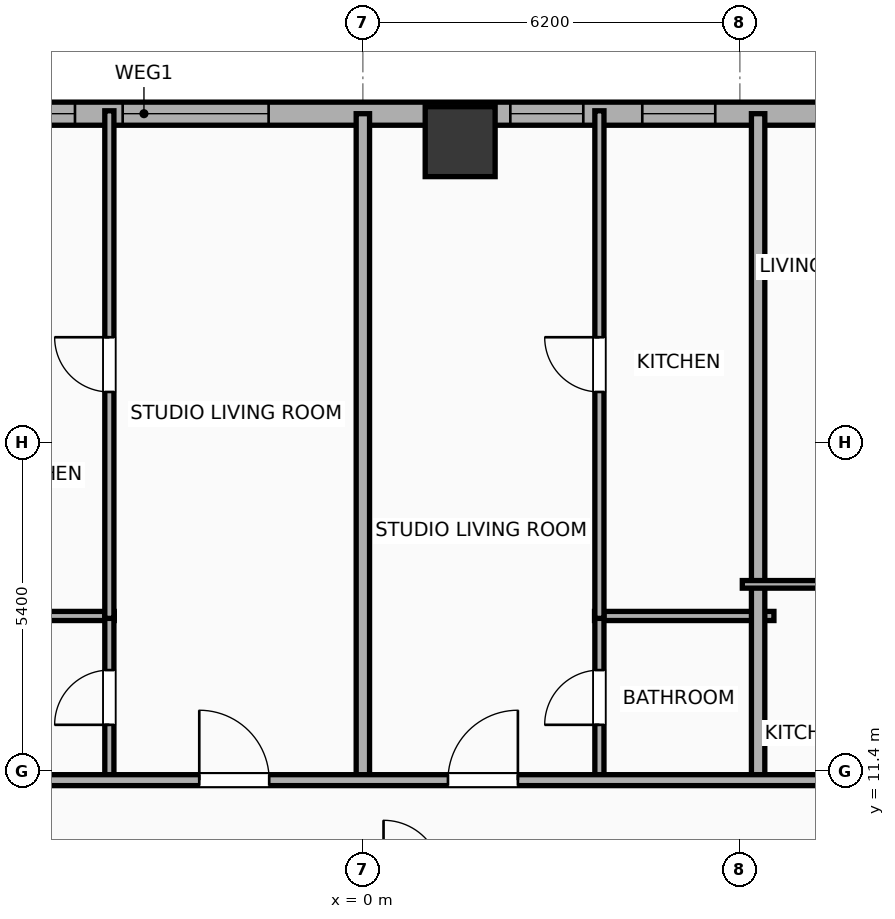
"""IFC4 building model, lengths in metres.
Left out: names, types, materials, properties, quantities, classifications, styles, units other than length and angle.
Written with IfcOpenShell. Run it as: python <this file> out.ifc"""

import sys

from ifc_helpers import new_model, si_unit, direction, frame, frame_2d, origin, origin_2d, place, context, subcontext, project, spatial, rectangle, hollow_rectangle, extrude, element, fill, save


model = new_model("IFC4")
c1 = context("Model", 3, precision=1e-05, world=origin(), true_north=direction((0.0, 1.0)))
c2 = subcontext(c1, "Body", "Model", "MODEL_VIEW")
j1 = project(units=[si_unit("LENGTHUNIT", "METRE"), si_unit("PLANEANGLEUNIT", "RADIAN")], contexts=[c1])
p1 = place(None, origin())
s1 = spatial("IfcSite", under=j1, at=p1, CompositionType="ELEMENT")
p2 = place(p1, origin())
s2 = spatial("IfcBuilding", under=s1, at=p2, CompositionType="ELEMENT")
p3 = place(p2, frame((0.0, 0.0, 76.7)))
s3 = spatial("IfcBuildingStorey", under=s2, at=p3, CompositionType="ELEMENT", Elevation=76.7)
p4 = place(p3, frame((1.6, 21.75, 0.0), z_axis=(0.0, 0.0, 1.0), x_axis=(1.0, 0.0, 0.0)))
e1 = element("IfcColumn", 1, at=p4, inside=s3, PredefinedType="COLUMN", context=c2, shape_type="SweptSolid", body=[
    extrude(hollow_rectangle(XDim=1.15, YDim=1.15, WallThickness=0.04, at=origin_2d()), origin(), (0.0, 0.0, 1.0), 3.9),
])
p5 = place(p3, frame((-29.581, 22.21, 0.0), z_axis=(0.0, 0.0, 1.0), x_axis=(1.0, 0.0, 0.0)))
e2 = element("IfcWall", 2, at=p5, inside=s3, PredefinedType="ELEMENTEDWALL", context=c2, shape_type="SweptSolid", body=[
    extrude(rectangle(XDim=51.963, YDim=0.38, at=frame_2d((25.981, 0.0))), origin(), (0.0, 0.0, 1.0), 3.6),
])
p6 = place(p5, frame((25.631, 0.0, 0.75)))
e3 = element("IfcOpeningElement", 3, at=p6, cuts=e2, PredefinedType="OPENING", context=c2, shape_type="SweptSolid", body=[
    extrude(rectangle(XDim=2.4, YDim=2.1, at=frame_2d((1.2, 1.05))), frame((0.0, 0.2, 0.0), z_axis=(0.0, -1.0, 0.0), x_axis=(1.0, 0.0, 0.0)), (0.0, 0.0, 1.0), 0.4),
])
p7 = place(p5, frame((42.952, 0.0, 0.75)))
e4 = element("IfcOpeningElement", 4, at=p7, cuts=e2, PredefinedType="OPENING", context=c2, shape_type="SweptSolid", body=[
    extrude(rectangle(XDim=2.4, YDim=2.1, at=frame_2d((1.2, 1.05))), frame((0.0, 0.2, 0.0), z_axis=(0.0, -1.0, 0.0), x_axis=(1.0, 0.0, 0.0)), (0.0, 0.0, 1.0), 0.4),
])
p8 = place(p5, frame((1.406, 0.0, 0.75)))
e5 = element("IfcOpeningElement", 5, at=p8, cuts=e2, PredefinedType="OPENING", context=c2, shape_type="SweptSolid", body=[
    extrude(rectangle(XDim=1.2, YDim=2.05, at=frame_2d((0.6, 1.025))), frame((0.0, 0.2, 0.0), z_axis=(0.0, -1.0, 0.0), x_axis=(1.0, 0.0, 0.0)), (0.0, 0.0, 1.0), 0.4),
])
p9 = place(p5, frame((4.297, 0.0, 0.75)))
e6 = element("IfcOpeningElement", 6, at=p9, cuts=e2, PredefinedType="OPENING", context=c2, shape_type="SweptSolid", body=[
    extrude(rectangle(XDim=1.2, YDim=2.05, at=frame_2d((0.6, 1.025))), frame((0.0, 0.2, 0.0), z_axis=(0.0, -1.0, 0.0), x_axis=(1.0, 0.0, 0.0)), (0.0, 0.0, 1.0), 0.4),
])
p10 = place(p5, frame((7.776, 0.0, 0.75)))
e7 = element("IfcOpeningElement", 7, at=p10, cuts=e2, PredefinedType="OPENING", context=c2, shape_type="SweptSolid", body=[
    extrude(rectangle(XDim=1.2, YDim=2.05, at=frame_2d((0.6, 1.025))), frame((0.0, 0.2, 0.0), z_axis=(0.0, -1.0, 0.0), x_axis=(1.0, 0.0, 0.0)), (0.0, 0.0, 1.0), 0.4),
])
p11 = place(p5, frame((14.036, 0.0, 0.75)))
e8 = element("IfcOpeningElement", 8, at=p11, cuts=e2, PredefinedType="OPENING", context=c2, shape_type="SweptSolid", body=[
    extrude(rectangle(XDim=1.2, YDim=2.05, at=frame_2d((0.6, 1.025))), frame((0.0, 0.2, 0.0), z_axis=(0.0, -1.0, 0.0), x_axis=(1.0, 0.0, 0.0)), (0.0, 0.0, 1.0), 0.4),
])
p12 = place(p5, frame((11.146, 0.0, 0.75)))
e9 = element("IfcOpeningElement", 9, at=p12, cuts=e2, PredefinedType="OPENING", context=c2, shape_type="SweptSolid", body=[
    extrude(rectangle(XDim=1.2, YDim=2.05, at=frame_2d((0.6, 1.025))), frame((0.0, 0.2, 0.0), z_axis=(0.0, -1.0, 0.0), x_axis=(1.0, 0.0, 0.0)), (0.0, 0.0, 1.0), 0.4),
])
p13 = place(p5, frame((18.751, 0.0, 0.75)))
e10 = element("IfcOpeningElement", 10, at=p13, cuts=e2, PredefinedType="OPENING", context=c2, shape_type="SweptSolid", body=[
    extrude(rectangle(XDim=1.2, YDim=2.05, at=frame_2d((0.6, 1.025))), frame((0.0, 0.2, 0.0), z_axis=(0.0, -1.0, 0.0), x_axis=(1.0, 0.0, 0.0)), (0.0, 0.0, 1.0), 0.4),
])
p14 = place(p5, frame((23.647, 0.0, 0.75)))
e11 = element("IfcOpeningElement", 11, at=p14, cuts=e2, PredefinedType="OPENING", context=c2, shape_type="SweptSolid", body=[
    extrude(rectangle(XDim=1.2, YDim=2.05, at=frame_2d((0.6, 1.025))), frame((0.0, 0.2, 0.0), z_axis=(0.0, -1.0, 0.0), x_axis=(1.0, 0.0, 0.0)), (0.0, 0.0, 1.0), 0.4),
])
p15 = place(p5, frame((32.006, 0.0, 0.75)))
e12 = element("IfcOpeningElement", 12, at=p15, cuts=e2, PredefinedType="OPENING", context=c2, shape_type="SweptSolid", body=[
    extrude(rectangle(XDim=1.2, YDim=2.05, at=frame_2d((0.6, 1.025))), frame((0.0, 0.2, 0.0), z_axis=(0.0, -1.0, 0.0), x_axis=(1.0, 0.0, 0.0)), (0.0, 0.0, 1.0), 0.4),
])
p16 = place(p5, frame((34.176, 0.0, 0.75)))
e13 = element("IfcOpeningElement", 13, at=p16, cuts=e2, PredefinedType="OPENING", context=c2, shape_type="SweptSolid", body=[
    extrude(rectangle(XDim=1.2, YDim=2.05, at=frame_2d((0.6, 1.025))), frame((0.0, 0.2, 0.0), z_axis=(0.0, -1.0, 0.0), x_axis=(1.0, 0.0, 0.0)), (0.0, 0.0, 1.0), 0.4),
])
p17 = place(p5, frame((37.063, 0.0, 0.75)))
e14 = element("IfcOpeningElement", 14, at=p17, cuts=e2, PredefinedType="OPENING", context=c2, shape_type="SweptSolid", body=[
    extrude(rectangle(XDim=1.2, YDim=2.05, at=frame_2d((0.6, 1.025))), frame((0.0, 0.2, 0.0), z_axis=(0.0, -1.0, 0.0), x_axis=(1.0, 0.0, 0.0)), (0.0, 0.0, 1.0), 0.4),
])
p18 = place(p5, frame((39.509, 0.0, 0.75)))
e15 = element("IfcOpeningElement", 15, at=p18, cuts=e2, PredefinedType="OPENING", context=c2, shape_type="SweptSolid", body=[
    extrude(rectangle(XDim=1.2, YDim=2.05, at=frame_2d((0.6, 1.025))), frame((0.0, 0.2, 0.0), z_axis=(0.0, -1.0, 0.0), x_axis=(1.0, 0.0, 0.0)), (0.0, 0.0, 1.0), 0.4),
])
p19 = place(p5, frame((46.921, 0.0, 0.75)))
e16 = element("IfcOpeningElement", 16, at=p19, cuts=e2, PredefinedType="OPENING", context=c2, shape_type="SweptSolid", body=[
    extrude(rectangle(XDim=1.2, YDim=2.05, at=frame_2d((0.6, 1.025))), frame((0.0, 0.2, 0.0), z_axis=(0.0, -1.0, 0.0), x_axis=(1.0, 0.0, 0.0)), (0.0, 0.0, 1.0), 0.4),
])
p20 = place(p5, frame((49.55, 0.0, 0.75)))
e17 = element("IfcOpeningElement", 17, at=p20, cuts=e2, PredefinedType="OPENING", context=c2, shape_type="SweptSolid", body=[
    extrude(rectangle(XDim=1.2, YDim=2.05, at=frame_2d((0.6, 1.025))), frame((0.0, 0.2, 0.0), z_axis=(0.0, -1.0, 0.0), x_axis=(1.0, 0.0, 0.0)), (0.0, 0.0, 1.0), 0.4),
])
p21 = place(p3, frame((-6.76, 13.95, 0.0), z_axis=(0.0, 0.0, 1.0), x_axis=(1.0, 0.0, 0.0)))
e18 = element("IfcWall", 18, at=p21, inside=s3, PredefinedType="PLUMBINGWALL", context=c2, shape_type="SweptSolid", body=[
    extrude(rectangle(XDim=2.671, YDim=0.15, at=frame_2d((1.335, 0.0))), origin(), (0.0, 0.0, 1.0), 3.6),
])
p22 = place(p3, frame((-4.169, 11.23, 0.0), z_axis=(0.0, 0.0, 1.0), x_axis=(0.0, 1.0, 0.0)))
e19 = element("IfcWall", 19, at=p22, inside=s3, PredefinedType="PLUMBINGWALL", context=c2, shape_type="SweptSolid", body=[
    extrude(rectangle(XDim=2.76, YDim=0.15, at=frame_2d((1.38, 0.0))), origin(), (0.0, 0.0, 1.0), 3.6),
])
p23 = place(p22, frame((0.93, 0.0, 0.0)))
e20 = element("IfcOpeningElement", 20, at=p23, cuts=e19, PredefinedType="OPENING", context=c2, shape_type="SweptSolid", body=[
    extrude(rectangle(XDim=0.9, YDim=2.05, at=frame_2d((0.45, 1.025))), frame((0.0, 0.085, 0.0), z_axis=(0.0, -1.0, 0.0), x_axis=(1.0, 0.0, 0.0)), (0.0, 0.0, 1.0), 0.17),
])
p24 = place(p3, frame((-4.169, 13.91, 0.0), z_axis=(0.0, 0.0, 1.0), x_axis=(0.0, 1.0, 0.0)))
e21 = element("IfcWall", 21, at=p24, inside=s3, PredefinedType="PLUMBINGWALL", context=c2, shape_type="SweptSolid", body=[
    extrude(rectangle(XDim=8.348, YDim=0.15, at=frame_2d((4.174, 0.0))), origin(), (0.0, 0.0, 1.0), 3.6),
])
p25 = place(p24, frame((3.724, 0.0, 0.0)))
e22 = element("IfcOpeningElement", 22, at=p25, cuts=e21, PredefinedType="OPENING", context=c2, shape_type="SweptSolid", body=[
    extrude(rectangle(XDim=0.9, YDim=2.05, at=frame_2d((0.45, 1.025))), frame((0.0, 0.085, 0.0), z_axis=(0.0, -1.0, 0.0), x_axis=(1.0, 0.0, 0.0)), (0.0, 0.0, 1.0), 0.17),
])
p26 = place(p3, frame((0.0, 11.17, 0.0), z_axis=(0.0, 0.0, 1.0), x_axis=(0.0, 1.0, 0.0)))
e23 = element("IfcWall", 23, at=p26, inside=s3, PredefinedType="PARTITIONING", context=c2, shape_type="SweptSolid", body=[
    extrude(rectangle(XDim=11.04, YDim=0.22, at=frame_2d((5.52, 0.0))), origin(), (0.0, 0.0, 1.0), 3.6),
])
p27 = place(p3, frame((3.81, 13.95, 0.0), z_axis=(0.0, 0.0, 1.0), x_axis=(1.0, 0.0, 0.0)))
e24 = element("IfcWall", 24, at=p27, inside=s3, PredefinedType="PLUMBINGWALL", context=c2, shape_type="SweptSolid", body=[
    extrude(rectangle(XDim=2.95, YDim=0.15, at=frame_2d((1.475, 0.0))), origin(), (0.0, 0.0, 1.0), 3.6),
])
p28 = place(p3, frame((3.89, 11.23, 0.0), z_axis=(0.0, 0.0, 1.0), x_axis=(0.0, 1.0, 0.0)))
e25 = element("IfcWall", 25, at=p28, inside=s3, PredefinedType="PLUMBINGWALL", context=c2, shape_type="SweptSolid", body=[
    extrude(rectangle(XDim=2.76, YDim=0.15, at=frame_2d((1.38, 0.0))), origin(), (0.0, 0.0, 1.0), 3.6),
])
p29 = place(p28, frame((0.93, 0.0, 0.0)))
e26 = element("IfcOpeningElement", 26, at=p29, cuts=e25, PredefinedType="OPENING", context=c2, shape_type="SweptSolid", body=[
    extrude(rectangle(XDim=0.9, YDim=2.05, at=frame_2d((0.45, 1.025))), frame((0.0, 0.085, 0.0), z_axis=(0.0, -1.0, 0.0), x_axis=(1.0, 0.0, 0.0)), (0.0, 0.0, 1.0), 0.17),
])
p30 = place(p3, frame((3.89, 13.91, 0.0), z_axis=(0.0, 0.0, 1.0), x_axis=(0.0, 1.0, 0.0)))
e27 = element("IfcWall", 27, at=p30, inside=s3, PredefinedType="PLUMBINGWALL", context=c2, shape_type="SweptSolid", body=[
    extrude(rectangle(XDim=8.348, YDim=0.15, at=frame_2d((4.174, 0.0))), origin(), (0.0, 0.0, 1.0), 3.6),
])
p31 = place(p30, frame((3.724, 0.0, 0.0)))
e28 = element("IfcOpeningElement", 28, at=p31, cuts=e27, PredefinedType="OPENING", context=c2, shape_type="SweptSolid", body=[
    extrude(rectangle(XDim=0.9, YDim=2.05, at=frame_2d((0.45, 1.025))), frame((0.0, 0.085, 0.0), z_axis=(0.0, -1.0, 0.0), x_axis=(1.0, 0.0, 0.0)), (0.0, 0.0, 1.0), 0.17),
])
p32 = place(p3, frame((6.5, 11.17, 0.0), z_axis=(0.0, 0.0, 1.0), x_axis=(0.0, 1.0, 0.0)))
e29 = element("IfcWall", 29, at=p32, inside=s3, PredefinedType="PARTITIONING", context=c2, shape_type="SweptSolid", body=[
    extrude(rectangle(XDim=11.04, YDim=0.22, at=frame_2d((5.52, 0.0))), origin(), (0.0, 0.0, 1.0), 3.6),
])
p33 = place(p3, frame((6.24, 14.47, 0.0), z_axis=(0.0, 0.0, 1.0), x_axis=(1.0, 0.0, 0.0)))
e30 = element("IfcWall", 30, at=p33, inside=s3, PredefinedType="PARTITIONING", context=c2, shape_type="SweptSolid", body=[
    extrude(rectangle(XDim=2.69, YDim=0.125, at=frame_2d((1.345, 0.0))), origin(), (0.0, 0.0, 1.0), 3.6),
])
p34 = place(p3, frame((-33.41, 11.25, 0.0), z_axis=(0.0, 0.0, 1.0), x_axis=(1.0, 0.0, 0.0)))
e31 = element("IfcWall", 31, at=p34, inside=s3, PredefinedType="PARTITIONING", context=c2, shape_type="SweptSolid", body=[
    extrude(rectangle(XDim=59.62, YDim=0.18, at=frame_2d((29.81, 0.0))), origin(), (0.0, 0.0, 1.0), 3.6),
])
p35 = place(p34, frame((3.157, 0.0, 0.0)))
e32 = element("IfcOpeningElement", 32, at=p35, cuts=e31, PredefinedType="OPENING", context=c2, shape_type="SweptSolid", body=[
    extrude(rectangle(XDim=0.9, YDim=2.05, at=frame_2d((0.45, 1.025))), frame((0.0, 0.1, 0.0), z_axis=(0.0, -1.0, 0.0), x_axis=(1.0, 0.0, 0.0)), (0.0, 0.0, 1.0), 0.2),
])
p36 = place(p34, frame((10.145, 0.0, 0.0)))
e33 = element("IfcOpeningElement", 33, at=p36, cuts=e31, PredefinedType="OPENING", context=c2, shape_type="SweptSolid", body=[
    extrude(rectangle(XDim=0.9, YDim=2.05, at=frame_2d((0.45, 1.025))), frame((0.0, 0.1, 0.0), z_axis=(0.0, -1.0, 0.0), x_axis=(1.0, 0.0, 0.0)), (0.0, 0.0, 1.0), 0.2),
])
p37 = place(p34, frame((17.86, 0.0, 0.0)))
e34 = element("IfcOpeningElement", 34, at=p37, cuts=e31, PredefinedType="OPENING", context=c2, shape_type="SweptSolid", body=[
    extrude(rectangle(XDim=1.15, YDim=2.05, at=frame_2d((0.575, 1.025))), frame((0.0, 0.1, 0.0), z_axis=(0.0, -1.0, 0.0), x_axis=(1.0, 0.0, 0.0)), (0.0, 0.0, 1.0), 0.2),
])
p38 = place(p34, frame((23.338, 0.0, 0.0)))
e35 = element("IfcOpeningElement", 35, at=p38, cuts=e31, PredefinedType="OPENING", context=c2, shape_type="SweptSolid", body=[
    extrude(rectangle(XDim=0.9, YDim=2.05, at=frame_2d((0.45, 1.025))), frame((0.0, 0.1, 0.0), z_axis=(0.0, -1.0, 0.0), x_axis=(1.0, 0.0, 0.0)), (0.0, 0.0, 1.0), 0.2),
])
p39 = place(p34, frame((30.719, 0.0, 0.0)))
e36 = element("IfcOpeningElement", 36, at=p39, cuts=e31, PredefinedType="OPENING", context=c2, shape_type="SweptSolid", body=[
    extrude(rectangle(XDim=1.15, YDim=2.05, at=frame_2d((0.575, 1.025))), frame((0.0, 0.1, 0.0), z_axis=(0.0, -1.0, 0.0), x_axis=(1.0, 0.0, 0.0)), (0.0, 0.0, 1.0), 0.2),
])
p40 = place(p34, frame((34.81, 0.0, 0.0)))
e37 = element("IfcOpeningElement", 37, at=p40, cuts=e31, PredefinedType="OPENING", context=c2, shape_type="SweptSolid", body=[
    extrude(rectangle(XDim=1.15, YDim=2.05, at=frame_2d((0.575, 1.025))), frame((0.0, 0.1, 0.0), z_axis=(0.0, -1.0, 0.0), x_axis=(1.0, 0.0, 0.0)), (0.0, 0.0, 1.0), 0.2),
])
p41 = place(p34, frame((42.912, 0.0, 0.0)))
e38 = element("IfcOpeningElement", 38, at=p41, cuts=e31, PredefinedType="OPENING", context=c2, shape_type="SweptSolid", body=[
    extrude(rectangle(XDim=0.9, YDim=2.05, at=frame_2d((0.45, 1.025))), frame((0.0, 0.1, 0.0), z_axis=(0.0, -1.0, 0.0), x_axis=(1.0, 0.0, 0.0)), (0.0, 0.0, 1.0), 0.2),
])
p42 = place(p34, frame((49.482, 0.0, 0.0)))
e39 = element("IfcOpeningElement", 39, at=p42, cuts=e31, PredefinedType="OPENING", context=c2, shape_type="SweptSolid", body=[
    extrude(rectangle(XDim=0.9, YDim=2.05, at=frame_2d((0.45, 1.025))), frame((0.0, 0.1, 0.0), z_axis=(0.0, -1.0, 0.0), x_axis=(1.0, 0.0, 0.0)), (0.0, 0.0, 1.0), 0.2),
])
p43 = place(p34, frame((56.088, 0.0, 0.0)))
e40 = element("IfcOpeningElement", 40, at=p43, cuts=e31, PredefinedType="OPENING", context=c2, shape_type="SweptSolid", body=[
    extrude(rectangle(XDim=0.9, YDim=2.05, at=frame_2d((0.45, 1.025))), frame((0.0, 0.1, 0.0), z_axis=(0.0, -1.0, 0.0), x_axis=(1.0, 0.0, 0.0)), (0.0, 0.0, 1.0), 0.2),
])
p44 = place(p6, origin())
e41 = element("IfcWindow", 41, at=p44, inside=s3, PartitioningType="SINGLE_PANEL", PredefinedType="WINDOW", context=c2, shape_type="SweptSolid", body=[
    extrude(rectangle(XDim=2.4, YDim=2.1, at=frame_2d((1.2, 1.05))), frame((0.0, 0.03, 0.0), z_axis=(0.0, -1.0, 0.0), x_axis=(1.0, 0.0, 0.0)), (0.0, 0.0, 1.0), 0.06),
])
fill(e3, e41)
p45 = place(p14, origin())
e42 = element("IfcWindow", 42, at=p45, inside=s3, PartitioningType="SINGLE_PANEL", PredefinedType="WINDOW", context=c2, shape_type="SweptSolid", body=[
    extrude(rectangle(XDim=1.2, YDim=2.05, at=frame_2d((0.6, 1.025))), frame((0.0, 0.03, 0.0), z_axis=(0.0, -1.0, 0.0), x_axis=(1.0, 0.0, 0.0)), (0.0, 0.0, 1.0), 0.06),
])
fill(e11, e42)
p46 = place(p15, origin())
e43 = element("IfcWindow", 43, at=p46, inside=s3, PartitioningType="SINGLE_PANEL", PredefinedType="WINDOW", context=c2, shape_type="SweptSolid", body=[
    extrude(rectangle(XDim=1.2, YDim=2.05, at=frame_2d((0.6, 1.025))), frame((0.0, 0.03, 0.0), z_axis=(0.0, -1.0, 0.0), x_axis=(1.0, 0.0, 0.0)), (0.0, 0.0, 1.0), 0.06),
])
fill(e12, e43)
p47 = place(p16, origin())
e44 = element("IfcWindow", 44, at=p47, inside=s3, PartitioningType="SINGLE_PANEL", PredefinedType="WINDOW", context=c2, shape_type="SweptSolid", body=[
    extrude(rectangle(XDim=1.2, YDim=2.05, at=frame_2d((0.6, 1.025))), frame((0.0, 0.03, 0.0), z_axis=(0.0, -1.0, 0.0), x_axis=(1.0, 0.0, 0.0)), (0.0, 0.0, 1.0), 0.06),
])
fill(e13, e44)
p48 = place(p23, origin())
e45 = element("IfcDoor", 45, at=p48, inside=s3, OperationType="SINGLE_SWING_LEFT", PredefinedType="DOOR", context=c2, shape_type="SweptSolid", body=[
    extrude(rectangle(XDim=0.9, YDim=2.05, at=frame_2d((0.45, 1.025))), frame((0.0, 0.025, 0.0), z_axis=(0.0, -1.0, 0.0), x_axis=(1.0, 0.0, 0.0)), (0.0, 0.0, 1.0), 0.05),
])
fill(e20, e45)
p49 = place(p25, origin())
e46 = element("IfcDoor", 46, at=p49, inside=s3, OperationType="SINGLE_SWING_RIGHT", PredefinedType="DOOR", context=c2, shape_type="SweptSolid", body=[
    extrude(rectangle(XDim=0.9, YDim=2.05, at=frame_2d((0.45, 1.025))), frame((0.0, 0.025, 0.0), z_axis=(0.0, -1.0, 0.0), x_axis=(1.0, 0.0, 0.0)), (0.0, 0.0, 1.0), 0.05),
])
fill(e22, e46)
p50 = place(p29, origin())
e47 = element("IfcDoor", 47, at=p50, inside=s3, OperationType="SINGLE_SWING_LEFT", PredefinedType="DOOR", context=c2, shape_type="SweptSolid", body=[
    extrude(rectangle(XDim=0.9, YDim=2.05, at=frame_2d((0.45, 1.025))), frame((0.0, 0.025, 0.0), z_axis=(0.0, -1.0, 0.0), x_axis=(1.0, 0.0, 0.0)), (0.0, 0.0, 1.0), 0.05),
])
fill(e26, e47)
p51 = place(p31, origin())
e48 = element("IfcDoor", 48, at=p51, inside=s3, OperationType="SINGLE_SWING_RIGHT", PredefinedType="DOOR", context=c2, shape_type="SweptSolid", body=[
    extrude(rectangle(XDim=0.9, YDim=2.05, at=frame_2d((0.45, 1.025))), frame((0.0, 0.025, 0.0), z_axis=(0.0, -1.0, 0.0), x_axis=(1.0, 0.0, 0.0)), (0.0, 0.0, 1.0), 0.05),
])
fill(e28, e48)
p52 = place(p39, origin())
e49 = element("IfcDoor", 49, at=p52, inside=s3, OperationType="SINGLE_SWING_LEFT", PredefinedType="DOOR", context=c2, shape_type="SweptSolid", body=[
    extrude(rectangle(XDim=1.15, YDim=2.05, at=frame_2d((0.575, 1.025))), frame((0.0, 0.025, 0.0), z_axis=(0.0, -1.0, 0.0), x_axis=(1.0, 0.0, 0.0)), (0.0, 0.0, 1.0), 0.05),
])
fill(e36, e49)
p53 = place(p40, origin())
e50 = element("IfcDoor", 50, at=p53, inside=s3, OperationType="SINGLE_SWING_RIGHT", PredefinedType="DOOR", context=c2, shape_type="SweptSolid", body=[
    extrude(rectangle(XDim=1.15, YDim=2.05, at=frame_2d((0.575, 1.025))), frame((0.0, 0.025, 0.0), z_axis=(0.0, -1.0, 0.0), x_axis=(1.0, 0.0, 0.0)), (0.0, 0.0, 1.0), 0.05),
])
fill(e37, e50)
save(model, sys.argv[1])
